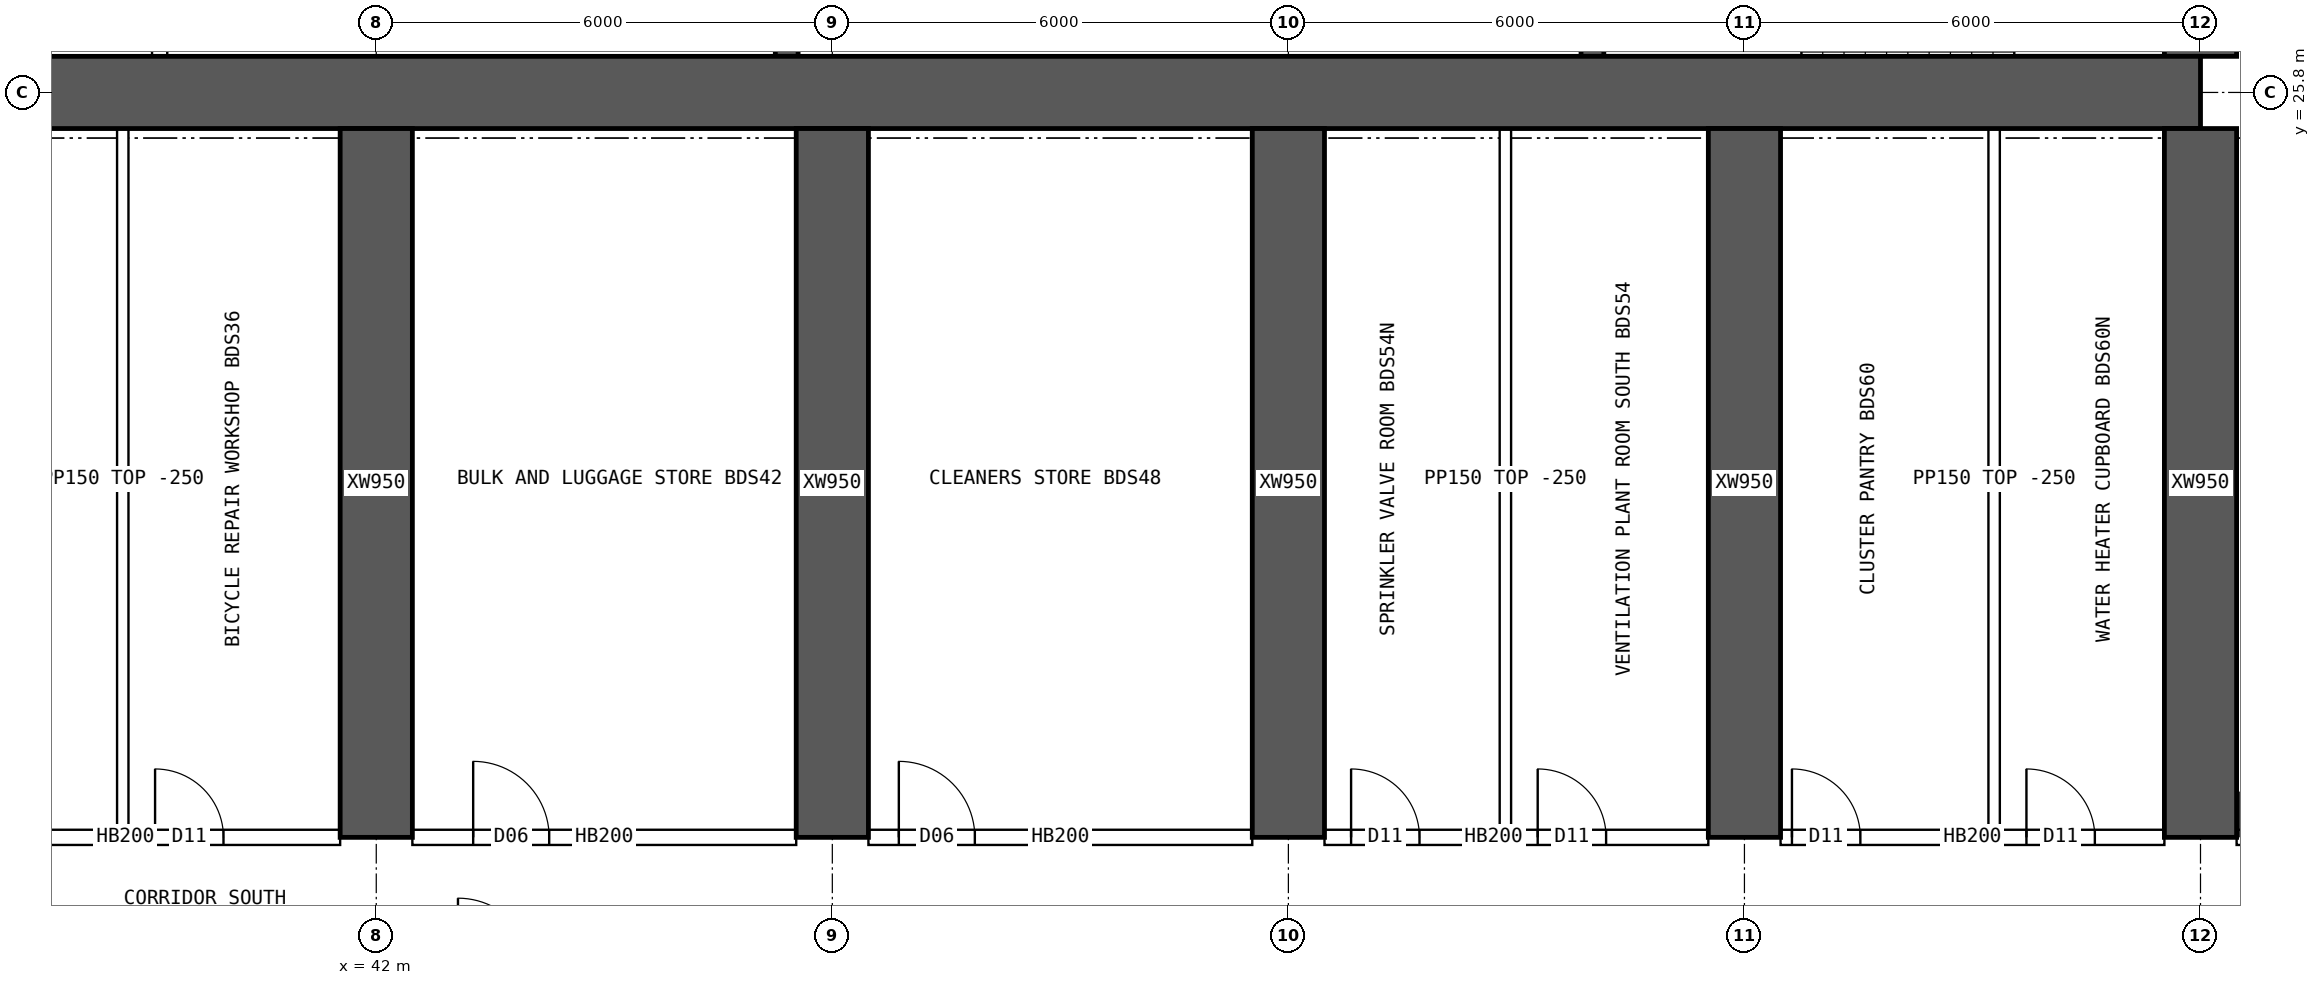
"""IFC4 building model, lengths in metres.
Left out: names, types, materials, properties, quantities, classifications, styles, units other than length and angle.
Written with IfcOpenShell. Run it as: python <this file> out.ifc"""

import sys

from ifc_helpers import new_model, si_unit, direction, frame, frame_2d, origin, place, context, subcontext, project, spatial, rectangle, extrude, element, fill, save


model = new_model("IFC4")
c1 = context("Model", 3, precision=1e-05, world=origin(), true_north=direction((0.0, 1.0)))
c2 = subcontext(c1, "Body", "Model", "MODEL_VIEW")
j1 = project(units=[si_unit("LENGTHUNIT", "METRE"), si_unit("PLANEANGLEUNIT", "RADIAN")], contexts=[c1])
p1 = place(None, origin())
s1 = spatial("IfcSite", under=j1, at=p1, CompositionType="ELEMENT")
p2 = place(p1, origin())
s2 = spatial("IfcBuilding", under=s1, at=p2, CompositionType="ELEMENT")
p3 = place(p2, frame((0.0, 0.0, 121.9)))
s3 = spatial("IfcBuildingStorey", under=s2, at=p3, CompositionType="ELEMENT", Elevation=121.9)
p4 = place(p3, frame((18.0, 25.8, 0.0), z_axis=(0.0, 0.0, 1.0), x_axis=(1.0, 0.0, 0.0)))
e1 = element("IfcWall", 1, at=p4, inside=s3, PredefinedType="SHEAR", context=c2, shape_type="SweptSolid", body=[
    extrude(rectangle(XDim=48.0, YDim=0.95, at=frame_2d((24.0, 0.0))), origin(), (0.0, 0.0, 1.0), 3.75),
])
p5 = place(p3, frame((66.0, 26.275, 0.0), z_axis=(0.0, 0.0, 1.0), x_axis=(0.0, 1.0, 0.0)))
e2 = element("IfcWall", 2, at=p5, inside=s3, PredefinedType="SHEAR", context=c2, shape_type="SweptSolid", body=[
    extrude(rectangle(XDim=11.45, YDim=0.95, at=frame_2d((5.725, 0.0))), origin(), (0.0, 0.0, 1.0), 3.75),
])
p6 = place(p5, frame((5.025, 0.0, 0.0)))
e3 = element("IfcOpeningElement", 3, at=p6, cuts=e2, PredefinedType="OPENING", context=c2, shape_type="SweptSolid", body=[
    extrude(rectangle(XDim=1.2, YDim=2.1, at=frame_2d((0.6, 1.05))), frame((0.0, 0.485, 0.0), z_axis=(0.0, -1.0, 0.0), x_axis=(1.0, 0.0, 0.0)), (0.0, 0.0, 1.0), 0.97),
])
for number, where, z_axis, x_axis in (
    (4, (58.0, 26.275, 0.0), (0.0, 0.0, 1.0), (0.0, 1.0, 0.0)),
    (5, (47.4, 26.275, 0.0), (0.0, 0.0, 1.0), (0.0, 1.0, 0.0)),
):
    element("IfcWall", number, at=place(p3, frame(where, z_axis=z_axis, x_axis=x_axis)), inside=s3, PredefinedType="SHEAR", context=c2, shape_type="SweptSolid", body=[
        extrude(rectangle(XDim=3.975, YDim=0.3, at=frame_2d((1.988, 0.0))), origin(), (0.0, 0.0, 1.0), 3.75),
    ])
for number, where, z_axis, x_axis in (
    (6, (42.0, 16.0, 0.0), (0.0, 0.0, 1.0), (0.0, 1.0, 0.0)),
    (7, (48.0, 16.0, 0.0), (0.0, 0.0, 1.0), (0.0, 1.0, 0.0)),
    (8, (54.0, 16.0, 0.0), (0.0, 0.0, 1.0), (0.0, 1.0, 0.0)),
    (9, (60.0, 16.0, 0.0), (0.0, 0.0, 1.0), (0.0, 1.0, 0.0)),
    (10, (66.0, 16.0, 0.0), (0.0, 0.0, 1.0), (0.0, 1.0, 0.0)),
):
    element("IfcWall", number, at=place(p3, frame(where, z_axis=z_axis, x_axis=x_axis)), inside=s3, PredefinedType="SHEAR", context=c2, shape_type="SweptSolid", body=[
        extrude(rectangle(XDim=9.325, YDim=0.95, at=frame_2d((4.663, 0.0))), origin(), (0.0, 0.0, 1.0), 3.75),
    ])
p7 = place(p3, frame((39.15, 26.275, 0.0), z_axis=(0.0, 0.0, 1.0), x_axis=(0.0, 1.0, 0.0)))
e11 = element("IfcWall", 11, at=p7, inside=s3, PredefinedType="SOLIDWALL", context=c2, shape_type="SweptSolid", body=[
    extrude(rectangle(XDim=3.975, YDim=0.2, at=frame_2d((1.988, 0.0))), origin(), (0.0, 0.0, 1.0), 3.5),
])
p8 = place(p3, frame((36.475, 16.0, 0.0), z_axis=(0.0, 0.0, 1.0), x_axis=(1.0, 0.0, 0.0)))
e12 = element("IfcWall", 12, at=p8, inside=s3, PredefinedType="SOLIDWALL", context=c2, shape_type="SweptSolid", body=[
    extrude(rectangle(XDim=5.05, YDim=0.2, at=frame_2d((2.525, 0.0))), origin(), (0.0, 0.0, 1.0), 3.5),
])
p9 = place(p8, frame((0.15, 0.0, 0.0)))
e13 = element("IfcOpeningElement", 13, at=p9, cuts=e12, PredefinedType="OPENING", context=c2, shape_type="SweptSolid", body=[
    extrude(rectangle(XDim=0.9, YDim=2.1, at=frame_2d((0.45, 1.05))), frame((0.0, 0.11, 0.0), z_axis=(0.0, -1.0, 0.0), x_axis=(1.0, 0.0, 0.0)), (0.0, 0.0, 1.0), 0.22),
])
p10 = place(p8, frame((2.615, 0.0, 0.0)))
e14 = element("IfcOpeningElement", 14, at=p10, cuts=e12, PredefinedType="OPENING", context=c2, shape_type="SweptSolid", body=[
    extrude(rectangle(XDim=0.9, YDim=2.1, at=frame_2d((0.45, 1.05))), frame((0.0, 0.11, 0.0), z_axis=(0.0, -1.0, 0.0), x_axis=(1.0, 0.0, 0.0)), (0.0, 0.0, 1.0), 0.22),
])
p11 = place(p3, frame((42.475, 16.0, 0.0), z_axis=(0.0, 0.0, 1.0), x_axis=(1.0, 0.0, 0.0)))
e15 = element("IfcWall", 15, at=p11, inside=s3, PredefinedType="SOLIDWALL", context=c2, shape_type="SweptSolid", body=[
    extrude(rectangle(XDim=5.05, YDim=0.2, at=frame_2d((2.525, 0.0))), origin(), (0.0, 0.0, 1.0), 3.5),
])
p12 = place(p11, frame((0.8, 0.0, 0.0)))
e16 = element("IfcOpeningElement", 16, at=p12, cuts=e15, PredefinedType="OPENING", context=c2, shape_type="SweptSolid", body=[
    extrude(rectangle(XDim=1.0, YDim=2.1, at=frame_2d((0.5, 1.05))), frame((0.0, 0.11, 0.0), z_axis=(0.0, -1.0, 0.0), x_axis=(1.0, 0.0, 0.0)), (0.0, 0.0, 1.0), 0.22),
])
p13 = place(p3, frame((48.475, 16.0, 0.0), z_axis=(0.0, 0.0, 1.0), x_axis=(1.0, 0.0, 0.0)))
e17 = element("IfcWall", 17, at=p13, inside=s3, PredefinedType="SOLIDWALL", context=c2, shape_type="SweptSolid", body=[
    extrude(rectangle(XDim=5.05, YDim=0.2, at=frame_2d((2.525, 0.0))), origin(), (0.0, 0.0, 1.0), 3.5),
])
p14 = place(p13, frame((0.4, 0.0, 0.0)))
e18 = element("IfcOpeningElement", 18, at=p14, cuts=e17, PredefinedType="OPENING", context=c2, shape_type="SweptSolid", body=[
    extrude(rectangle(XDim=1.0, YDim=2.1, at=frame_2d((0.5, 1.05))), frame((0.0, 0.11, 0.0), z_axis=(0.0, -1.0, 0.0), x_axis=(1.0, 0.0, 0.0)), (0.0, 0.0, 1.0), 0.22),
])
p15 = place(p3, frame((54.475, 16.0, 0.0), z_axis=(0.0, 0.0, 1.0), x_axis=(1.0, 0.0, 0.0)))
e19 = element("IfcWall", 19, at=p15, inside=s3, PredefinedType="SOLIDWALL", context=c2, shape_type="SweptSolid", body=[
    extrude(rectangle(XDim=5.05, YDim=0.2, at=frame_2d((2.525, 0.0))), origin(), (0.0, 0.0, 1.0), 3.5),
])
p16 = place(p15, frame((0.35, 0.0, 0.0)))
e20 = element("IfcOpeningElement", 20, at=p16, cuts=e19, PredefinedType="OPENING", context=c2, shape_type="SweptSolid", body=[
    extrude(rectangle(XDim=0.9, YDim=2.1, at=frame_2d((0.45, 1.05))), frame((0.0, 0.11, 0.0), z_axis=(0.0, -1.0, 0.0), x_axis=(1.0, 0.0, 0.0)), (0.0, 0.0, 1.0), 0.22),
])
p17 = place(p15, frame((2.805, 0.0, 0.0)))
e21 = element("IfcOpeningElement", 21, at=p17, cuts=e19, PredefinedType="OPENING", context=c2, shape_type="SweptSolid", body=[
    extrude(rectangle(XDim=0.9, YDim=2.1, at=frame_2d((0.45, 1.05))), frame((0.0, 0.11, 0.0), z_axis=(0.0, -1.0, 0.0), x_axis=(1.0, 0.0, 0.0)), (0.0, 0.0, 1.0), 0.22),
])
p18 = place(p3, frame((60.475, 16.0, 0.0), z_axis=(0.0, 0.0, 1.0), x_axis=(1.0, 0.0, 0.0)))
e22 = element("IfcWall", 22, at=p18, inside=s3, PredefinedType="SOLIDWALL", context=c2, shape_type="SweptSolid", body=[
    extrude(rectangle(XDim=5.05, YDim=0.2, at=frame_2d((2.525, 0.0))), origin(), (0.0, 0.0, 1.0), 3.5),
])
p19 = place(p18, frame((0.15, 0.0, 0.0)))
e23 = element("IfcOpeningElement", 23, at=p19, cuts=e22, PredefinedType="OPENING", context=c2, shape_type="SweptSolid", body=[
    extrude(rectangle(XDim=0.9, YDim=2.1, at=frame_2d((0.45, 1.05))), frame((0.0, 0.11, 0.0), z_axis=(0.0, -1.0, 0.0), x_axis=(1.0, 0.0, 0.0)), (0.0, 0.0, 1.0), 0.22),
])
p20 = place(p18, frame((3.235, 0.0, 0.0)))
e24 = element("IfcOpeningElement", 24, at=p20, cuts=e22, PredefinedType="OPENING", context=c2, shape_type="SweptSolid", body=[
    extrude(rectangle(XDim=0.9, YDim=2.1, at=frame_2d((0.45, 1.05))), frame((0.0, 0.11, 0.0), z_axis=(0.0, -1.0, 0.0), x_axis=(1.0, 0.0, 0.0)), (0.0, 0.0, 1.0), 0.22),
])
p21 = place(p3, frame((66.475, 16.0, 0.0), z_axis=(0.0, 0.0, 1.0), x_axis=(1.0, 0.0, 0.0)))
e25 = element("IfcWall", 25, at=p21, inside=s3, PredefinedType="SOLIDWALL", context=c2, shape_type="SweptSolid", body=[
    extrude(rectangle(XDim=1.925, YDim=0.2, at=frame_2d((0.962, 0.0))), origin(), (0.0, 0.0, 1.0), 3.5),
])
p22 = place(p21, frame((0.05, 0.0, 0.0)))
e26 = element("IfcOpeningElement", 26, at=p22, cuts=e25, PredefinedType="OPENING", context=c2, shape_type="SweptSolid", body=[
    extrude(rectangle(XDim=1.2, YDim=2.1, at=frame_2d((0.6, 1.05))), frame((0.0, 0.11, 0.0), z_axis=(0.0, -1.0, 0.0), x_axis=(1.0, 0.0, 0.0)), (0.0, 0.0, 1.0), 0.22),
])
for number, where, z_axis, x_axis in (
    (27, (38.665, 16.1, 0.0), (0.0, 0.0, 1.0), (0.0, 1.0, 0.0)),
    (28, (56.855, 16.1, 0.0), (0.0, 0.0, 1.0), (0.0, 1.0, 0.0)),
    (29, (63.285, 16.1, 0.0), (0.0, 0.0, 1.0), (0.0, 1.0, 0.0)),
):
    element("IfcWall", number, at=place(p3, frame(where, z_axis=z_axis, x_axis=x_axis)), inside=s3, PredefinedType="PARTITIONING", context=c2, shape_type="SweptSolid", body=[
        extrude(rectangle(XDim=9.225, YDim=0.15, at=frame_2d((4.612, 0.0))), origin(), (0.0, 0.0, 1.0), 3.5),
    ])
p23 = place(p10, origin())
e30 = element("IfcDoor", 30, at=p23, inside=s3, OperationType="SINGLE_SWING_LEFT", PredefinedType="DOOR", context=c2, shape_type="SweptSolid", body=[
    extrude(rectangle(XDim=0.9, YDim=2.1, at=frame_2d((0.45, 1.05))), frame((0.0, 0.025, 0.0), z_axis=(0.0, -1.0, 0.0), x_axis=(1.0, 0.0, 0.0)), (0.0, 0.0, 1.0), 0.05),
])
fill(e14, e30)
p24 = place(p12, origin())
e31 = element("IfcDoor", 31, at=p24, inside=s3, OperationType="SINGLE_SWING_LEFT", PredefinedType="DOOR", context=c2, shape_type="SweptSolid", body=[
    extrude(rectangle(XDim=1.0, YDim=2.1, at=frame_2d((0.5, 1.05))), frame((0.0, 0.025, 0.0), z_axis=(0.0, -1.0, 0.0), x_axis=(1.0, 0.0, 0.0)), (0.0, 0.0, 1.0), 0.05),
])
fill(e16, e31)
p25 = place(p14, origin())
e32 = element("IfcDoor", 32, at=p25, inside=s3, OperationType="SINGLE_SWING_LEFT", PredefinedType="DOOR", context=c2, shape_type="SweptSolid", body=[
    extrude(rectangle(XDim=1.0, YDim=2.1, at=frame_2d((0.5, 1.05))), frame((0.0, 0.025, 0.0), z_axis=(0.0, -1.0, 0.0), x_axis=(1.0, 0.0, 0.0)), (0.0, 0.0, 1.0), 0.05),
])
fill(e18, e32)
p26 = place(p16, origin())
e33 = element("IfcDoor", 33, at=p26, inside=s3, OperationType="SINGLE_SWING_LEFT", PredefinedType="DOOR", context=c2, shape_type="SweptSolid", body=[
    extrude(rectangle(XDim=0.9, YDim=2.1, at=frame_2d((0.45, 1.05))), frame((0.0, 0.025, 0.0), z_axis=(0.0, -1.0, 0.0), x_axis=(1.0, 0.0, 0.0)), (0.0, 0.0, 1.0), 0.05),
])
fill(e20, e33)
p27 = place(p17, origin())
e34 = element("IfcDoor", 34, at=p27, inside=s3, OperationType="SINGLE_SWING_LEFT", PredefinedType="DOOR", context=c2, shape_type="SweptSolid", body=[
    extrude(rectangle(XDim=0.9, YDim=2.1, at=frame_2d((0.45, 1.05))), frame((0.0, 0.025, 0.0), z_axis=(0.0, -1.0, 0.0), x_axis=(1.0, 0.0, 0.0)), (0.0, 0.0, 1.0), 0.05),
])
fill(e21, e34)
p28 = place(p19, origin())
e35 = element("IfcDoor", 35, at=p28, inside=s3, OperationType="SINGLE_SWING_LEFT", PredefinedType="DOOR", context=c2, shape_type="SweptSolid", body=[
    extrude(rectangle(XDim=0.9, YDim=2.1, at=frame_2d((0.45, 1.05))), frame((0.0, 0.025, 0.0), z_axis=(0.0, -1.0, 0.0), x_axis=(1.0, 0.0, 0.0)), (0.0, 0.0, 1.0), 0.05),
])
fill(e23, e35)
p29 = place(p20, origin())
e36 = element("IfcDoor", 36, at=p29, inside=s3, OperationType="SINGLE_SWING_LEFT", PredefinedType="DOOR", context=c2, shape_type="SweptSolid", body=[
    extrude(rectangle(XDim=0.9, YDim=2.1, at=frame_2d((0.45, 1.05))), frame((0.0, 0.025, 0.0), z_axis=(0.0, -1.0, 0.0), x_axis=(1.0, 0.0, 0.0)), (0.0, 0.0, 1.0), 0.05),
])
fill(e24, e36)
save(model, sys.argv[1])
